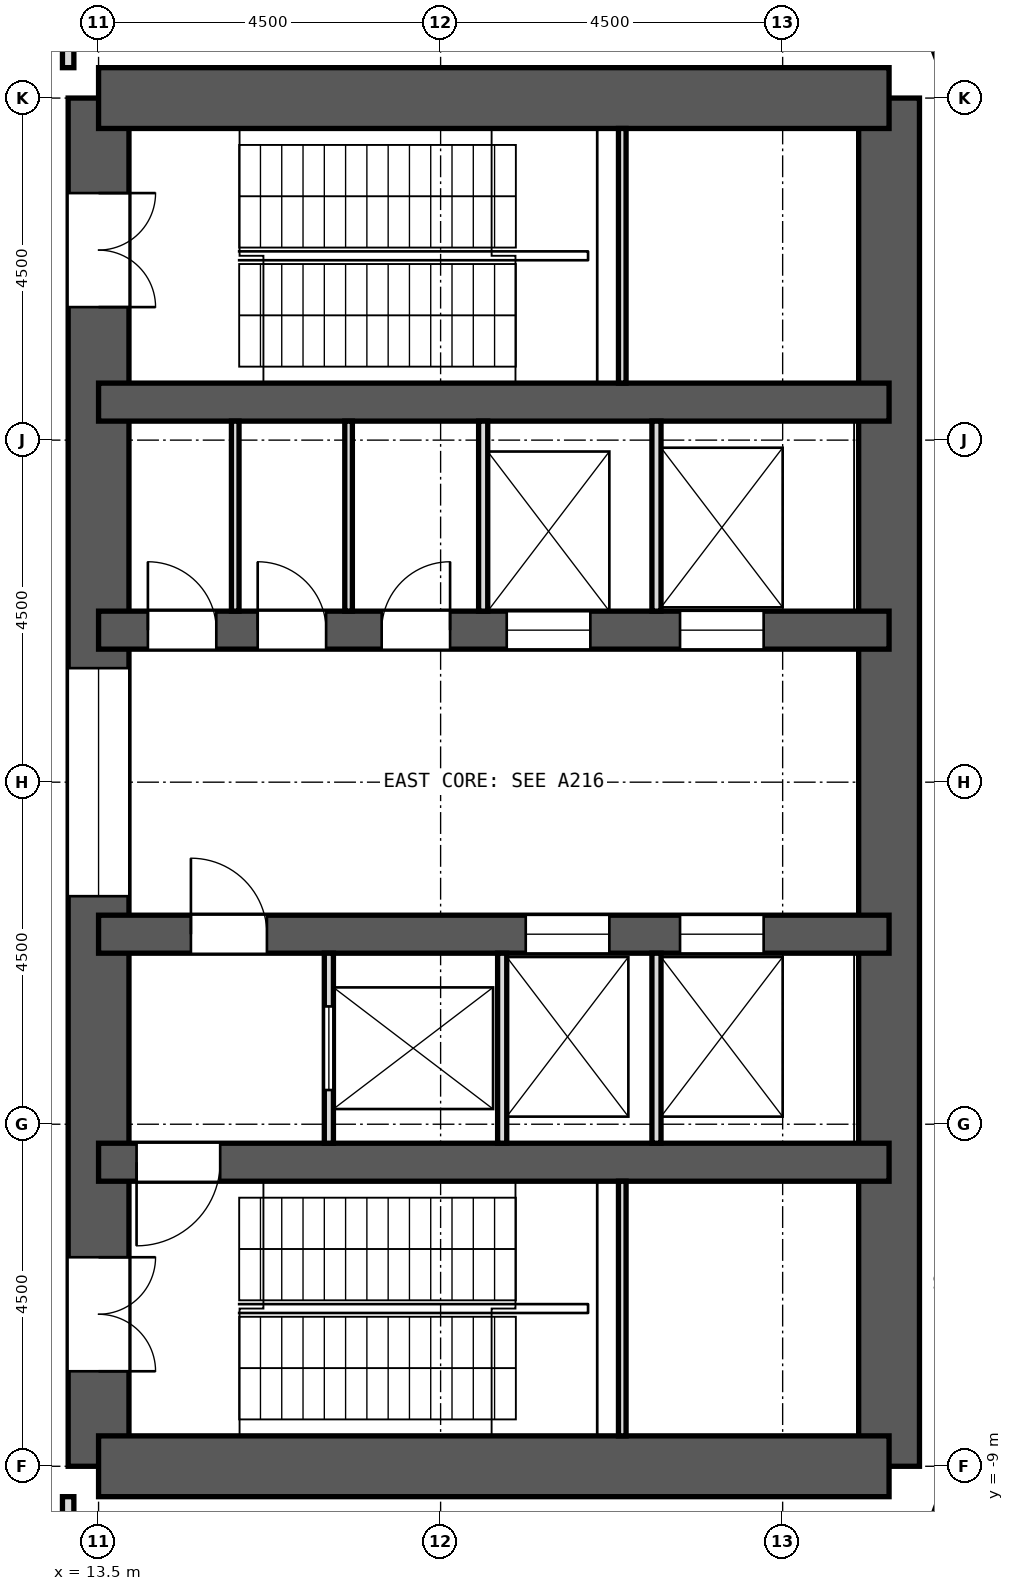
"""IFC4 building model, lengths in metres.
Left out: names, types, materials, properties, quantities, classifications, styles, units other than length and angle.
Written with IfcOpenShell. Run it as: python <this file> out.ifc"""

import sys

from ifc_helpers import new_model, si_unit, direction, frame, frame_2d, origin, place, context, subcontext, project, spatial, rectangle, extrude, element, fill, save


model = new_model("IFC4")
c1 = context("Model", 3, precision=1e-05, world=origin(), true_north=direction((0.0, 1.0)))
c2 = subcontext(c1, "Body", "Model", "MODEL_VIEW")
j1 = project(units=[si_unit("LENGTHUNIT", "METRE"), si_unit("PLANEANGLEUNIT", "RADIAN")], contexts=[c1])
p1 = place(None, origin())
s1 = spatial("IfcSite", under=j1, at=p1, CompositionType="ELEMENT")
p2 = place(p1, origin())
s2 = spatial("IfcBuilding", under=s1, at=p2, CompositionType="ELEMENT")
p3 = place(p2, frame((0.0, 0.0, 86.9)))
s3 = spatial("IfcBuildingStorey", under=s2, at=p3, CompositionType="ELEMENT", Elevation=86.9)
p4 = place(p3, frame((13.5, -9.0, 0.0), z_axis=(0.0, 0.0, 1.0), x_axis=(0.0, 1.0, 0.0)))
e1 = element("IfcWall", 1, at=p4, inside=s3, PredefinedType="SHEAR", context=c2, shape_type="SweptSolid", body=[
    extrude(rectangle(XDim=18.0, YDim=0.8, at=frame_2d((9.0, 0.0))), origin(), (0.0, 0.0, 1.0), 5.0),
])
p5 = place(p4, frame((15.25, 0.0, 0.0)))
e2 = element("IfcOpeningElement", 2, at=p5, cuts=e1, PredefinedType="OPENING", context=c2, shape_type="SweptSolid", body=[
    extrude(rectangle(XDim=1.5, YDim=2.1, at=frame_2d((0.75, 1.05))), frame((0.0, 0.412, 0.0), z_axis=(0.0, -1.0, 0.0), x_axis=(1.0, 0.0, 0.0)), (0.0, 0.0, 1.0), 0.824),
])
p6 = place(p4, frame((1.25, 0.0, 0.0)))
e3 = element("IfcOpeningElement", 3, at=p6, cuts=e1, PredefinedType="OPENING", context=c2, shape_type="SweptSolid", body=[
    extrude(rectangle(XDim=1.5, YDim=2.1, at=frame_2d((0.75, 1.05))), frame((0.0, 0.412, 0.0), z_axis=(0.0, -1.0, 0.0), x_axis=(1.0, 0.0, 0.0)), (0.0, 0.0, 1.0), 0.824),
])
p7 = place(p4, frame((7.5, 0.0, 0.0)))
e4 = element("IfcOpeningElement", 4, at=p7, cuts=e1, PredefinedType="OPENING", context=c2, shape_type="SweptSolid", body=[
    extrude(rectangle(XDim=3.0, YDim=2.4, at=frame_2d((1.5, 1.2))), frame((0.0, 0.412, 0.0), z_axis=(0.0, -1.0, 0.0), x_axis=(1.0, 0.0, 0.0)), (0.0, 0.0, 1.0), 0.824),
])
p8 = place(p3, frame((23.9, -9.0, 0.0), z_axis=(0.0, 0.0, 1.0), x_axis=(0.0, 1.0, 0.0)))
e5 = element("IfcWall", 5, at=p8, inside=s3, PredefinedType="SHEAR", context=c2, shape_type="SweptSolid", body=[
    extrude(rectangle(XDim=18.0, YDim=0.8, at=frame_2d((9.0, 0.0))), origin(), (0.0, 0.0, 1.0), 5.0),
])
for number, where, z_axis, x_axis in (
    (6, (13.5, 9.0, 0.0), (0.0, 0.0, 1.0), (1.0, 0.0, 0.0)),
    (7, (13.5, -9.0, 0.0), (0.0, 0.0, 1.0), (1.0, 0.0, 0.0)),
):
    element("IfcWall", number, at=place(p3, frame(where, z_axis=z_axis, x_axis=x_axis)), inside=s3, PredefinedType="SHEAR", context=c2, shape_type="SweptSolid", body=[
        extrude(rectangle(XDim=10.4, YDim=0.8, at=frame_2d((5.2, 0.0))), origin(), (0.0, 0.0, 1.0), 5.0),
    ])
p9 = place(p3, frame((13.5, 5.0, 0.0), z_axis=(0.0, 0.0, 1.0), x_axis=(1.0, 0.0, 0.0)))
e8 = element("IfcWall", 8, at=p9, inside=s3, PredefinedType="SHEAR", context=c2, shape_type="SweptSolid", body=[
    extrude(rectangle(XDim=10.4, YDim=0.5, at=frame_2d((5.2, 0.0))), origin(), (0.0, 0.0, 1.0), 5.0),
])
p10 = place(p3, frame((13.5, -5.0, 0.0), z_axis=(0.0, 0.0, 1.0), x_axis=(1.0, 0.0, 0.0)))
e9 = element("IfcWall", 9, at=p10, inside=s3, PredefinedType="SHEAR", context=c2, shape_type="SweptSolid", body=[
    extrude(rectangle(XDim=10.4, YDim=0.5, at=frame_2d((5.2, 0.0))), origin(), (0.0, 0.0, 1.0), 5.0),
])
p11 = place(p10, frame((0.5, 0.0, 0.0)))
e10 = element("IfcOpeningElement", 10, at=p11, cuts=e9, PredefinedType="OPENING", context=c2, shape_type="SweptSolid", body=[
    extrude(rectangle(XDim=1.1, YDim=2.1, at=frame_2d((0.55, 1.05))), frame((0.0, 0.262, 0.0), z_axis=(0.0, -1.0, 0.0), x_axis=(1.0, 0.0, 0.0)), (0.0, 0.0, 1.0), 0.524),
])
p12 = place(p3, frame((13.5, 2.0, 0.0), z_axis=(0.0, 0.0, 1.0), x_axis=(1.0, 0.0, 0.0)))
e11 = element("IfcWall", 11, at=p12, inside=s3, PredefinedType="SHEAR", context=c2, shape_type="SweptSolid", body=[
    extrude(rectangle(XDim=10.4, YDim=0.5, at=frame_2d((5.2, 0.0))), origin(), (0.0, 0.0, 1.0), 5.0),
])
p13 = place(p12, frame((5.37, 0.0, 0.0)))
e12 = element("IfcOpeningElement", 12, at=p13, cuts=e11, PredefinedType="OPENING", context=c2, shape_type="SweptSolid", body=[
    extrude(rectangle(XDim=1.1, YDim=2.1, at=frame_2d((0.55, 1.05))), frame((0.0, 0.262, 0.0), z_axis=(0.0, -1.0, 0.0), x_axis=(1.0, 0.0, 0.0)), (0.0, 0.0, 1.0), 0.524),
])
p14 = place(p12, frame((7.65, 0.0, 0.0)))
e13 = element("IfcOpeningElement", 13, at=p14, cuts=e11, PredefinedType="OPENING", context=c2, shape_type="SweptSolid", body=[
    extrude(rectangle(XDim=1.1, YDim=2.1, at=frame_2d((0.55, 1.05))), frame((0.0, 0.262, 0.0), z_axis=(0.0, -1.0, 0.0), x_axis=(1.0, 0.0, 0.0)), (0.0, 0.0, 1.0), 0.524),
])
p15 = place(p12, frame((0.649, 0.0, 0.0)))
e14 = element("IfcOpeningElement", 14, at=p15, cuts=e11, PredefinedType="OPENING", context=c2, shape_type="SweptSolid", body=[
    extrude(rectangle(XDim=0.9, YDim=2.1, at=frame_2d((0.45, 1.05))), frame((0.0, 0.262, 0.0), z_axis=(0.0, -1.0, 0.0), x_axis=(1.0, 0.0, 0.0)), (0.0, 0.0, 1.0), 0.524),
])
p16 = place(p12, frame((2.094, 0.0, 0.0)))
e15 = element("IfcOpeningElement", 15, at=p16, cuts=e11, PredefinedType="OPENING", context=c2, shape_type="SweptSolid", body=[
    extrude(rectangle(XDim=0.9, YDim=2.1, at=frame_2d((0.45, 1.05))), frame((0.0, 0.262, 0.0), z_axis=(0.0, -1.0, 0.0), x_axis=(1.0, 0.0, 0.0)), (0.0, 0.0, 1.0), 0.524),
])
p17 = place(p12, frame((3.725, 0.0, 0.0)))
e16 = element("IfcOpeningElement", 16, at=p17, cuts=e11, PredefinedType="OPENING", context=c2, shape_type="SweptSolid", body=[
    extrude(rectangle(XDim=0.9, YDim=2.1, at=frame_2d((0.45, 1.05))), frame((0.0, 0.262, 0.0), z_axis=(0.0, -1.0, 0.0), x_axis=(1.0, 0.0, 0.0)), (0.0, 0.0, 1.0), 0.524),
])
p18 = place(p3, frame((13.5, -2.0, 0.0), z_axis=(0.0, 0.0, 1.0), x_axis=(1.0, 0.0, 0.0)))
e17 = element("IfcWall", 17, at=p18, inside=s3, PredefinedType="SHEAR", context=c2, shape_type="SweptSolid", body=[
    extrude(rectangle(XDim=10.4, YDim=0.5, at=frame_2d((5.2, 0.0))), origin(), (0.0, 0.0, 1.0), 5.0),
])
p19 = place(p18, frame((5.62, 0.0, 0.0)))
e18 = element("IfcOpeningElement", 18, at=p19, cuts=e17, PredefinedType="OPENING", context=c2, shape_type="SweptSolid", body=[
    extrude(rectangle(XDim=1.1, YDim=2.1, at=frame_2d((0.55, 1.05))), frame((0.0, 0.262, 0.0), z_axis=(0.0, -1.0, 0.0), x_axis=(1.0, 0.0, 0.0)), (0.0, 0.0, 1.0), 0.524),
])
p20 = place(p18, frame((7.65, 0.0, 0.0)))
e19 = element("IfcOpeningElement", 19, at=p20, cuts=e17, PredefinedType="OPENING", context=c2, shape_type="SweptSolid", body=[
    extrude(rectangle(XDim=1.1, YDim=2.1, at=frame_2d((0.55, 1.05))), frame((0.0, 0.262, 0.0), z_axis=(0.0, -1.0, 0.0), x_axis=(1.0, 0.0, 0.0)), (0.0, 0.0, 1.0), 0.524),
])
p21 = place(p18, frame((1.215, 0.0, 0.0)))
e20 = element("IfcOpeningElement", 20, at=p21, cuts=e17, PredefinedType="OPENING", context=c2, shape_type="SweptSolid", body=[
    extrude(rectangle(XDim=1.0, YDim=2.1, at=frame_2d((0.5, 1.05))), frame((0.0, 0.262, 0.0), z_axis=(0.0, -1.0, 0.0), x_axis=(1.0, 0.0, 0.0)), (0.0, 0.0, 1.0), 0.524),
])
for number, where, z_axis, x_axis in (
    (21, (25.617, 7.383, 0.0), (0.0, 0.0, 1.0), (-0.342, 0.94, 0.0)),
    (22, (24.369, -10.811, 0.0), (0.0, 0.0, 1.0), (0.342, 0.94, 0.0)),
):
    element("IfcWall", number, at=place(p3, frame(where, z_axis=z_axis, x_axis=x_axis)), inside=s3, PredefinedType="SOLIDWALL", context=c2, shape_type="SweptSolid", body=[
        extrude(rectangle(XDim=3.648, YDim=0.6, at=frame_2d((1.824, 0.0))), origin(), (0.0, 0.0, 1.0), 4.5),
    ])
p22 = place(p3, frame((9.077, -9.077, 0.0), z_axis=(0.0, 0.0, 1.0), x_axis=(0.707106781187, -0.707106781187, 0.0)))
e23 = element("IfcWall", 23, at=p22, inside=s3, PredefinedType="PARTITIONING", context=c2, shape_type="SweptSolid", body=[
    extrude(rectangle(XDim=5.62, YDim=0.15, at=frame_2d((2.81, 0.0))), origin(), (0.0, 0.0, 1.0), 4.5),
])
p23 = place(p22, frame((2.396, 0.0, 0.0)))
e24 = element("IfcOpeningElement", 24, at=p23, cuts=e23, PredefinedType="OPENING", context=c2, shape_type="SweptSolid", body=[
    extrude(rectangle(XDim=0.9, YDim=2.1, at=frame_2d((0.45, 1.05))), frame((0.0, 0.087, 0.0), z_axis=(0.0, -1.0, 0.0), x_axis=(1.0, 0.0, 0.0)), (0.0, 0.0, 1.0), 0.174),
])
p24 = place(p3, frame((9.13, 9.13, 0.0), z_axis=(0.0, 0.0, 1.0), x_axis=(0.707106781187, 0.707106781187, 0.0)))
e25 = element("IfcWall", 25, at=p24, inside=s3, PredefinedType="PARTITIONING", context=c2, shape_type="SweptSolid", body=[
    extrude(rectangle(XDim=5.545, YDim=0.15, at=frame_2d((2.772, 0.0))), origin(), (0.0, 0.0, 1.0), 4.5),
])
p25 = place(p24, frame((1.89, 0.0, 0.0)))
e26 = element("IfcOpeningElement", 26, at=p25, cuts=e25, PredefinedType="OPENING", context=c2, shape_type="SweptSolid", body=[
    extrude(rectangle(XDim=0.9, YDim=2.1, at=frame_2d((0.45, 1.05))), frame((0.0, 0.087, 0.0), z_axis=(0.0, -1.0, 0.0), x_axis=(1.0, 0.0, 0.0)), (0.0, 0.0, 1.0), 0.174),
])
p26 = place(p3, frame((13.1, -13.025, 0.0), z_axis=(0.0, 0.0, 1.0), x_axis=(0.0, 1.0, 0.0)))
e27 = element("IfcWall", 27, at=p26, inside=s3, PredefinedType="PARTITIONING", context=c2, shape_type="SweptSolid", body=[
    extrude(rectangle(XDim=3.625, YDim=0.15, at=frame_2d((1.812, 0.0))), origin(), (0.0, 0.0, 1.0), 4.5),
])
p27 = place(p26, frame((1.175, 0.0, 0.0)))
e28 = element("IfcOpeningElement", 28, at=p27, cuts=e27, PredefinedType="OPENING", context=c2, shape_type="SweptSolid", body=[
    extrude(rectangle(XDim=1.2, YDim=2.1, at=frame_2d((0.6, 1.05))), frame((0.0, 0.087, 0.0), z_axis=(0.0, -1.0, 0.0), x_axis=(1.0, 0.0, 0.0)), (0.0, 0.0, 1.0), 0.174),
])
p28 = place(p3, frame((13.1, 9.4, 0.0), z_axis=(0.0, 0.0, 1.0), x_axis=(0.0, 1.0, 0.0)))
e29 = element("IfcWall", 29, at=p28, inside=s3, PredefinedType="PARTITIONING", context=c2, shape_type="SweptSolid", body=[
    extrude(rectangle(XDim=3.625, YDim=0.15, at=frame_2d((1.812, 0.0))), origin(), (0.0, 0.0, 1.0), 4.5),
])
p29 = place(p28, frame((0.95, 0.0, 0.0)))
e30 = element("IfcOpeningElement", 30, at=p29, cuts=e29, PredefinedType="OPENING", context=c2, shape_type="SweptSolid", body=[
    extrude(rectangle(XDim=1.8, YDim=2.1, at=frame_2d((0.9, 1.05))), frame((0.0, 0.087, 0.0), z_axis=(0.0, -1.0, 0.0), x_axis=(1.0, 0.0, 0.0)), (0.0, 0.0, 1.0), 0.174),
])
for number, where, z_axis, x_axis in (
    (31, (15.298, 2.25, 0.0), (0.0, 0.0, 1.0), (0.0, 1.0, 0.0)),
    (32, (16.789, 2.25, 0.0), (0.0, 0.0, 1.0), (0.0, 1.0, 0.0)),
):
    element("IfcWall", number, at=place(p3, frame(where, z_axis=z_axis, x_axis=x_axis)), inside=s3, PredefinedType="PARTITIONING", context=c2, shape_type="SweptSolid", body=[
        extrude(rectangle(XDim=2.5, YDim=0.1, at=frame_2d((1.25, 0.0))), origin(), (0.0, 0.0, 1.0), 4.5),
    ])
for number, where, z_axis, x_axis in (
    (33, (18.56, 2.25, 0.0), (0.0, 0.0, 1.0), (0.0, 1.0, 0.0)),
    (34, (20.84, 2.25, 0.0), (0.0, 0.0, 1.0), (0.0, 1.0, 0.0)),
):
    element("IfcWall", number, at=place(p3, frame(where, z_axis=z_axis, x_axis=x_axis)), inside=s3, PredefinedType="PARTITIONING", context=c2, shape_type="SweptSolid", body=[
        extrude(rectangle(XDim=2.5, YDim=0.12, at=frame_2d((1.25, 0.0))), origin(), (0.0, 0.0, 1.0), 4.5),
    ])
p30 = place(p3, frame((16.53, -4.75, 0.0), z_axis=(0.0, 0.0, 1.0), x_axis=(0.0, 1.0, 0.0)))
e35 = element("IfcWall", 35, at=p30, inside=s3, PredefinedType="PARTITIONING", context=c2, shape_type="SweptSolid", body=[
    extrude(rectangle(XDim=2.5, YDim=0.12, at=frame_2d((1.25, 0.0))), origin(), (0.0, 0.0, 1.0), 4.5),
])
p31 = place(p30, frame((0.7, 0.0, 0.0)))
e36 = element("IfcOpeningElement", 36, at=p31, cuts=e35, PredefinedType="OPENING", context=c2, shape_type="SweptSolid", body=[
    extrude(rectangle(XDim=1.1, YDim=2.1, at=frame_2d((0.55, 1.05))), frame((0.0, 0.072, 0.0), z_axis=(0.0, -1.0, 0.0), x_axis=(1.0, 0.0, 0.0)), (0.0, 0.0, 1.0), 0.144),
])
for number, where, z_axis, x_axis in (
    (37, (18.81, -4.75, 0.0), (0.0, 0.0, 1.0), (0.0, 1.0, 0.0)),
    (38, (20.84, -4.75, 0.0), (0.0, 0.0, 1.0), (0.0, 1.0, 0.0)),
):
    element("IfcWall", number, at=place(p3, frame(where, z_axis=z_axis, x_axis=x_axis)), inside=s3, PredefinedType="PARTITIONING", context=c2, shape_type="SweptSolid", body=[
        extrude(rectangle(XDim=2.5, YDim=0.12, at=frame_2d((1.25, 0.0))), origin(), (0.0, 0.0, 1.0), 4.5),
    ])
for number, where, z_axis, x_axis in (
    (39, (20.39, 5.25, 0.0), (0.0, 0.0, 1.0), (0.0, 1.0, 0.0)),
    (40, (20.39, -8.6, 0.0), (0.0, 0.0, 1.0), (0.0, 1.0, 0.0)),
):
    element("IfcWall", number, at=place(p3, frame(where, z_axis=z_axis, x_axis=x_axis)), inside=s3, PredefinedType="PARTITIONING", context=c2, shape_type="SweptSolid", body=[
        extrude(rectangle(XDim=3.35, YDim=0.1, at=frame_2d((1.675, 0.0))), origin(), (0.0, 0.0, 1.0), 4.5),
    ])
p32 = place(p13, origin())
e41 = element("IfcDoor", 41, at=p32, inside=s3, OperationType="DOUBLE_DOOR_SLIDING", PredefinedType="DOOR", context=c2, shape_type="SweptSolid", body=[
    extrude(rectangle(XDim=1.1, YDim=2.1, at=frame_2d((0.55, 1.05))), frame((0.0, 0.025, 0.0), z_axis=(0.0, -1.0, 0.0), x_axis=(1.0, 0.0, 0.0)), (0.0, 0.0, 1.0), 0.05),
])
fill(e12, e41)
p33 = place(p14, origin())
e42 = element("IfcDoor", 42, at=p33, inside=s3, OperationType="DOUBLE_DOOR_SLIDING", PredefinedType="DOOR", context=c2, shape_type="SweptSolid", body=[
    extrude(rectangle(XDim=1.1, YDim=2.1, at=frame_2d((0.55, 1.05))), frame((0.0, 0.025, 0.0), z_axis=(0.0, -1.0, 0.0), x_axis=(1.0, 0.0, 0.0)), (0.0, 0.0, 1.0), 0.05),
])
fill(e13, e42)
p34 = place(p31, origin())
e43 = element("IfcDoor", 43, at=p34, inside=s3, OperationType="DOUBLE_DOOR_SLIDING", PredefinedType="DOOR", context=c2, shape_type="SweptSolid", body=[
    extrude(rectangle(XDim=1.1, YDim=2.1, at=frame_2d((0.55, 1.05))), frame((0.0, 0.025, 0.0), z_axis=(0.0, -1.0, 0.0), x_axis=(1.0, 0.0, 0.0)), (0.0, 0.0, 1.0), 0.05),
])
fill(e36, e43)
p35 = place(p19, origin())
e44 = element("IfcDoor", 44, at=p35, inside=s3, OperationType="DOUBLE_DOOR_SLIDING", PredefinedType="DOOR", context=c2, shape_type="SweptSolid", body=[
    extrude(rectangle(XDim=1.1, YDim=2.1, at=frame_2d((0.55, 1.05))), frame((0.0, 0.025, 0.0), z_axis=(0.0, -1.0, 0.0), x_axis=(1.0, 0.0, 0.0)), (0.0, 0.0, 1.0), 0.05),
])
fill(e18, e44)
p36 = place(p20, origin())
e45 = element("IfcDoor", 45, at=p36, inside=s3, OperationType="DOUBLE_DOOR_SLIDING", PredefinedType="DOOR", context=c2, shape_type="SweptSolid", body=[
    extrude(rectangle(XDim=1.1, YDim=2.1, at=frame_2d((0.55, 1.05))), frame((0.0, 0.025, 0.0), z_axis=(0.0, -1.0, 0.0), x_axis=(1.0, 0.0, 0.0)), (0.0, 0.0, 1.0), 0.05),
])
fill(e19, e45)
p37 = place(p15, origin())
e46 = element("IfcDoor", 46, at=p37, inside=s3, OperationType="SINGLE_SWING_LEFT", PredefinedType="DOOR", context=c2, shape_type="SweptSolid", body=[
    extrude(rectangle(XDim=0.9, YDim=2.1, at=frame_2d((0.45, 1.05))), frame((0.0, 0.025, 0.0), z_axis=(0.0, -1.0, 0.0), x_axis=(1.0, 0.0, 0.0)), (0.0, 0.0, 1.0), 0.05),
])
fill(e14, e46)
p38 = place(p16, origin())
e47 = element("IfcDoor", 47, at=p38, inside=s3, OperationType="SINGLE_SWING_LEFT", PredefinedType="DOOR", context=c2, shape_type="SweptSolid", body=[
    extrude(rectangle(XDim=0.9, YDim=2.1, at=frame_2d((0.45, 1.05))), frame((0.0, 0.025, 0.0), z_axis=(0.0, -1.0, 0.0), x_axis=(1.0, 0.0, 0.0)), (0.0, 0.0, 1.0), 0.05),
])
fill(e15, e47)
p39 = place(p17, origin())
e48 = element("IfcDoor", 48, at=p39, inside=s3, OperationType="SINGLE_SWING_RIGHT", PredefinedType="DOOR", context=c2, shape_type="SweptSolid", body=[
    extrude(rectangle(XDim=0.9, YDim=2.1, at=frame_2d((0.45, 1.05))), frame((0.0, 0.025, 0.0), z_axis=(0.0, -1.0, 0.0), x_axis=(1.0, 0.0, 0.0)), (0.0, 0.0, 1.0), 0.05),
])
fill(e16, e48)
p40 = place(p21, origin())
e49 = element("IfcDoor", 49, at=p40, inside=s3, OperationType="SINGLE_SWING_LEFT", PredefinedType="DOOR", context=c2, shape_type="SweptSolid", body=[
    extrude(rectangle(XDim=1.0, YDim=2.1, at=frame_2d((0.5, 1.05))), frame((0.0, 0.025, 0.0), z_axis=(0.0, -1.0, 0.0), x_axis=(1.0, 0.0, 0.0)), (0.0, 0.0, 1.0), 0.05),
])
fill(e20, e49)
p41 = place(p11, frame((1.1, 0.0, 0.0), z_axis=(0.0, 0.0, 1.0), x_axis=(-1.0, 0.0, 0.0)))
e50 = element("IfcDoor", 50, at=p41, inside=s3, OperationType="SINGLE_SWING_RIGHT", PredefinedType="DOOR", context=c2, shape_type="SweptSolid", body=[
    extrude(rectangle(XDim=1.1, YDim=2.1, at=frame_2d((0.55, 1.05))), frame((0.0, 0.025, 0.0), z_axis=(0.0, -1.0, 0.0), x_axis=(1.0, 0.0, 0.0)), (0.0, 0.0, 1.0), 0.05),
])
fill(e10, e50)
p42 = place(p5, frame((1.5, 0.0, 0.0), z_axis=(0.0, 0.0, 1.0), x_axis=(-1.0, 0.0, 0.0)))
e51 = element("IfcDoor", 51, at=p42, inside=s3, OperationType="DOUBLE_DOOR_SINGLE_SWING", PredefinedType="DOOR", context=c2, shape_type="SweptSolid", body=[
    extrude(rectangle(XDim=1.5, YDim=2.1, at=frame_2d((0.75, 1.05))), frame((0.0, 0.025, 0.0), z_axis=(0.0, -1.0, 0.0), x_axis=(1.0, 0.0, 0.0)), (0.0, 0.0, 1.0), 0.05),
])
fill(e2, e51)
p43 = place(p6, frame((1.5, 0.0, 0.0), z_axis=(0.0, 0.0, 1.0), x_axis=(-1.0, 0.0, 0.0)))
e52 = element("IfcDoor", 52, at=p43, inside=s3, OperationType="DOUBLE_DOOR_SINGLE_SWING", PredefinedType="DOOR", context=c2, shape_type="SweptSolid", body=[
    extrude(rectangle(XDim=1.5, YDim=2.1, at=frame_2d((0.75, 1.05))), frame((0.0, 0.025, 0.0), z_axis=(0.0, -1.0, 0.0), x_axis=(1.0, 0.0, 0.0)), (0.0, 0.0, 1.0), 0.05),
])
fill(e3, e52)
p44 = place(p7, origin())
e53 = element("IfcDoor", 53, at=p44, inside=s3, OperationType="DOUBLE_DOOR_SLIDING", PredefinedType="DOOR", context=c2, shape_type="SweptSolid", body=[
    extrude(rectangle(XDim=3.0, YDim=2.4, at=frame_2d((1.5, 1.2))), frame((0.0, 0.025, 0.0), z_axis=(0.0, -1.0, 0.0), x_axis=(1.0, 0.0, 0.0)), (0.0, 0.0, 1.0), 0.05),
])
fill(e4, e53)
save(model, sys.argv[1])
